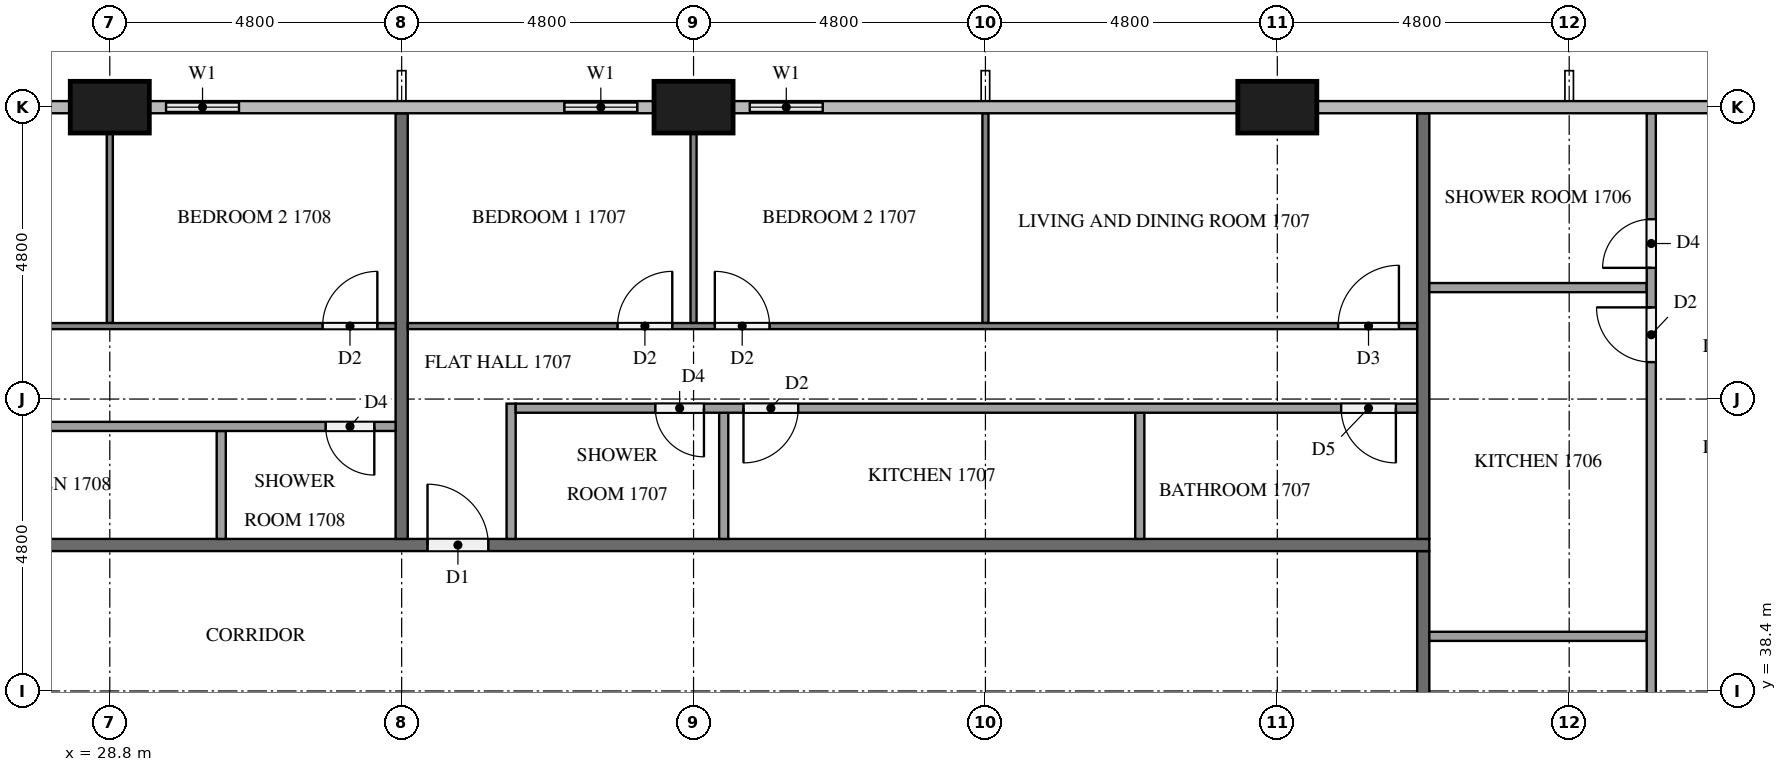
"""IFC4 building model, lengths in metres.
Left out: names, types, materials, properties, quantities, classifications, styles, units other than length and angle.
Written with IfcOpenShell. Run it as: python <this file> out.ifc"""

import sys

from ifc_helpers import new_model, si_unit, direction, frame, frame_2d, origin, origin_2d, place, context, subcontext, project, spatial, rectangle, extrude, element, fill, save


model = new_model("IFC4")
c1 = context("Model", 3, precision=1e-05, world=origin(), true_north=direction((0.0, 1.0)))
c2 = subcontext(c1, "Body", "Model", "MODEL_VIEW")
j1 = project(units=[si_unit("LENGTHUNIT", "METRE"), si_unit("PLANEANGLEUNIT", "RADIAN")], contexts=[c1])
p1 = place(None, origin())
s1 = spatial("IfcSite", under=j1, at=p1, CompositionType="ELEMENT")
p2 = place(p1, origin())
s2 = spatial("IfcBuilding", under=s1, at=p2, CompositionType="ELEMENT")
p3 = place(p2, frame((0.0, 0.0, 69.8)))
s3 = spatial("IfcBuildingStorey", under=s2, at=p3, CompositionType="ELEMENT", Elevation=69.8)
for number, where, z_axis, x_axis in (
    (1, (48.0, 48.0, 0.0), (0.0, 0.0, 1.0), (1.0, 0.0, 0.0)),
    (2, (38.4, 48.0, 0.0), (0.0, 0.0, 1.0), (1.0, 0.0, 0.0)),
    (3, (28.8, 48.0, 0.0), (0.0, 0.0, 1.0), (1.0, 0.0, 0.0)),
):
    element("IfcColumn", number, at=place(p3, frame(where, z_axis=z_axis, x_axis=x_axis)), inside=s3, PredefinedType="COLUMN", context=c2, shape_type="SweptSolid", body=[
        extrude(rectangle(XDim=1.3, YDim=0.85, at=origin_2d()), origin(), (0.0, 0.0, 1.0), 3.2),
    ])
p4 = place(p3, frame((40.8, 48.0, 0.0), z_axis=(0.0, 0.0, 1.0), x_axis=(-1.0, 0.0, 0.0)))
e4 = element("IfcWall", 4, at=p4, inside=s3, PredefinedType="SOLIDWALL", context=c2, shape_type="SweptSolid", body=[
    extrude(rectangle(XDim=1.75, YDim=0.15, at=frame_2d((0.875, 0.0))), origin(), (0.0, 0.0, 1.0), 3.2),
])
p5 = place(p4, frame((0.275, 0.0, 0.9)))
e5 = element("IfcOpeningElement", 5, at=p5, cuts=e4, PredefinedType="OPENING", context=c2, shape_type="SweptSolid", body=[
    extrude(rectangle(XDim=1.2, YDim=1.4, at=frame_2d((0.6, 0.7))), frame((0.0, 0.085, 0.0), z_axis=(0.0, -1.0, 0.0), x_axis=(1.0, 0.0, 0.0)), (0.0, 0.0, 1.0), 0.17),
])
p6 = place(p3, frame((37.75, 48.0, 0.0), z_axis=(0.0, 0.0, 1.0), x_axis=(-1.0, 0.0, 0.0)))
e6 = element("IfcWall", 6, at=p6, inside=s3, PredefinedType="SOLIDWALL", context=c2, shape_type="SweptSolid", body=[
    extrude(rectangle(XDim=1.75, YDim=0.15, at=frame_2d((0.875, 0.0))), origin(), (0.0, 0.0, 1.0), 3.2),
])
p7 = place(p6, frame((0.275, 0.0, 0.9)))
e7 = element("IfcOpeningElement", 7, at=p7, cuts=e6, PredefinedType="OPENING", context=c2, shape_type="SweptSolid", body=[
    extrude(rectangle(XDim=1.2, YDim=1.4, at=frame_2d((0.6, 0.7))), frame((0.0, 0.085, 0.0), z_axis=(0.0, -1.0, 0.0), x_axis=(1.0, 0.0, 0.0)), (0.0, 0.0, 1.0), 0.17),
])
p8 = place(p3, frame((31.2, 48.0, 0.0), z_axis=(0.0, 0.0, 1.0), x_axis=(-1.0, 0.0, 0.0)))
e8 = element("IfcWall", 8, at=p8, inside=s3, PredefinedType="SOLIDWALL", context=c2, shape_type="SweptSolid", body=[
    extrude(rectangle(XDim=1.75, YDim=0.15, at=frame_2d((0.875, 0.0))), origin(), (0.0, 0.0, 1.0), 3.2),
])
p9 = place(p8, frame((0.275, 0.0, 0.9)))
e9 = element("IfcOpeningElement", 9, at=p9, cuts=e8, PredefinedType="OPENING", context=c2, shape_type="SweptSolid", body=[
    extrude(rectangle(XDim=1.2, YDim=1.4, at=frame_2d((0.6, 0.7))), frame((0.0, 0.085, 0.0), z_axis=(0.0, -1.0, 0.0), x_axis=(1.0, 0.0, 0.0)), (0.0, 0.0, 1.0), 0.17),
])
p10 = place(p3, frame((50.4, 40.7, 0.0), z_axis=(0.0, 0.0, 1.0), x_axis=(0.0, -1.0, 0.0)))
e10 = element("IfcWall", 10, at=p10, inside=s3, PredefinedType="PARTITIONING", context=c2, shape_type="SweptSolid", body=[
    extrude(rectangle(XDim=28.6, YDim=0.2, at=frame_2d((14.3, 0.0))), origin(), (0.0, 0.0, 1.0), 3.2),
])
p11 = place(p10, frame((21.875, 0.0, 0.0)))
e11 = element("IfcOpeningElement", 11, at=p11, cuts=e10, PredefinedType="OPENING", context=c2, shape_type="SweptSolid", body=[
    extrude(rectangle(XDim=1.1, YDim=2.1, at=frame_2d((0.55, 1.05))), frame((0.0, 0.11, 0.0), z_axis=(0.0, -1.0, 0.0), x_axis=(1.0, 0.0, 0.0)), (0.0, 0.0, 1.0), 0.22),
])
p12 = place(p10, frame((20.075, 0.0, 0.0)))
e12 = element("IfcOpeningElement", 12, at=p12, cuts=e10, PredefinedType="OPENING", context=c2, shape_type="SweptSolid", body=[
    extrude(rectangle(XDim=1.0, YDim=2.1, at=frame_2d((0.5, 1.05))), frame((0.0, 0.11, 0.0), z_axis=(0.0, -1.0, 0.0), x_axis=(1.0, 0.0, 0.0)), (0.0, 0.0, 1.0), 0.22),
])
p13 = place(p10, frame((5.675, 0.0, 0.0)))
e13 = element("IfcOpeningElement", 13, at=p13, cuts=e10, PredefinedType="OPENING", context=c2, shape_type="SweptSolid", body=[
    extrude(rectangle(XDim=1.0, YDim=2.1, at=frame_2d((0.5, 1.05))), frame((0.0, 0.11, 0.0), z_axis=(0.0, -1.0, 0.0), x_axis=(1.0, 0.0, 0.0)), (0.0, 0.0, 1.0), 0.22),
])
p14 = place(p3, frame((11.9, 40.8, 0.0), z_axis=(0.0, 0.0, 1.0), x_axis=(1.0, 0.0, 0.0)))
e14 = element("IfcWall", 14, at=p14, inside=s3, PredefinedType="PARTITIONING", context=c2, shape_type="SweptSolid", body=[
    extrude(rectangle(XDim=38.6, YDim=0.2, at=frame_2d((19.3, 0.0))), origin(), (0.0, 0.0, 1.0), 3.2),
])
p15 = place(p14, frame((22.125, 0.0, 0.0)))
e15 = element("IfcOpeningElement", 15, at=p15, cuts=e14, PredefinedType="OPENING", context=c2, shape_type="SweptSolid", body=[
    extrude(rectangle(XDim=1.0, YDim=2.1, at=frame_2d((0.5, 1.05))), frame((0.0, 0.11, 0.0), z_axis=(0.0, -1.0, 0.0), x_axis=(1.0, 0.0, 0.0)), (0.0, 0.0, 1.0), 0.22),
])
p16 = place(p14, frame((7.725, 0.0, 0.0)))
e16 = element("IfcOpeningElement", 16, at=p16, cuts=e14, PredefinedType="OPENING", context=c2, shape_type="SweptSolid", body=[
    extrude(rectangle(XDim=1.0, YDim=2.1, at=frame_2d((0.5, 1.05))), frame((0.0, 0.11, 0.0), z_axis=(0.0, -1.0, 0.0), x_axis=(1.0, 0.0, 0.0)), (0.0, 0.0, 1.0), 0.22),
])
p17 = place(p14, frame((5.875, 0.0, 0.0)))
e17 = element("IfcOpeningElement", 17, at=p17, cuts=e14, PredefinedType="OPENING", context=c2, shape_type="SweptSolid", body=[
    extrude(rectangle(XDim=1.0, YDim=2.1, at=frame_2d((0.5, 1.05))), frame((0.0, 0.11, 0.0), z_axis=(0.0, -1.0, 0.0), x_axis=(1.0, 0.0, 0.0)), (0.0, 0.0, 1.0), 0.22),
])
for number, where, z_axis, x_axis in (
    (18, (50.4, 40.9, 0.0), (0.0, 0.0, 1.0), (0.0, 1.0, 0.0)),
    (19, (33.6, 47.9, 0.0), (0.0, 0.0, 1.0), (0.0, -1.0, 0.0)),
):
    element("IfcWall", number, at=place(p3, frame(where, z_axis=z_axis, x_axis=x_axis)), inside=s3, PredefinedType="PARTITIONING", context=c2, shape_type="SweptSolid", body=[
        extrude(rectangle(XDim=7.0, YDim=0.2, at=frame_2d((3.5, 0.0))), origin(), (0.0, 0.0, 1.0), 3.2),
    ])
for number, where, z_axis, x_axis in (
    (20, (50.5, 39.298, 0.0), (0.0, 0.0, 1.0), (1.0, 0.0, 0.0)),
    (21, (50.5, 45.033, 0.0), (0.0, 0.0, 1.0), (1.0, 0.0, 0.0)),
):
    element("IfcWall", number, at=place(p3, frame(where, z_axis=z_axis, x_axis=x_axis)), inside=s3, PredefinedType="PARTITIONING", context=c2, shape_type="SweptSolid", body=[
        extrude(rectangle(XDim=3.575, YDim=0.15, at=frame_2d((1.788, 0.0))), origin(), (0.0, 0.0, 1.0), 3.2),
    ])
p18 = place(p3, frame((54.15, 35.475, 0.0), z_axis=(0.0, 0.0, 1.0), x_axis=(0.0, 1.0, 0.0)))
e22 = element("IfcWall", 22, at=p18, inside=s3, PredefinedType="PARTITIONING", context=c2, shape_type="SweptSolid", body=[
    extrude(rectangle(XDim=12.425, YDim=0.15, at=frame_2d((6.212, 0.0))), origin(), (0.0, 0.0, 1.0), 3.2),
])
p19 = place(p18, frame((0.3, 0.0, 0.0)))
e23 = element("IfcOpeningElement", 23, at=p19, cuts=e22, PredefinedType="OPENING", context=c2, shape_type="SweptSolid", body=[
    extrude(rectangle(XDim=0.9, YDim=2.1, at=frame_2d((0.45, 1.05))), frame((0.0, 0.085, 0.0), z_axis=(0.0, -1.0, 0.0), x_axis=(1.0, 0.0, 0.0)), (0.0, 0.0, 1.0), 0.17),
])
p20 = place(p18, frame((8.333, 0.0, 0.0)))
e24 = element("IfcOpeningElement", 24, at=p20, cuts=e22, PredefinedType="OPENING", context=c2, shape_type="SweptSolid", body=[
    extrude(rectangle(XDim=0.9, YDim=2.1, at=frame_2d((0.45, 1.05))), frame((0.0, 0.085, 0.0), z_axis=(0.0, -1.0, 0.0), x_axis=(1.0, 0.0, 0.0)), (0.0, 0.0, 1.0), 0.17),
])
p21 = place(p18, frame((9.883, 0.0, 0.0)))
e25 = element("IfcOpeningElement", 25, at=p21, cuts=e22, PredefinedType="OPENING", context=c2, shape_type="SweptSolid", body=[
    extrude(rectangle(XDim=0.8, YDim=2.1, at=frame_2d((0.4, 1.05))), frame((0.0, 0.085, 0.0), z_axis=(0.0, -1.0, 0.0), x_axis=(1.0, 0.0, 0.0)), (0.0, 0.0, 1.0), 0.17),
])
p22 = place(p3, frame((38.4, 44.45, 0.0), z_axis=(0.0, 0.0, 1.0), x_axis=(0.0, 1.0, 0.0)))
e26 = element("IfcWall", 26, at=p22, inside=s3, PredefinedType="PARTITIONING", context=c2, shape_type="SweptSolid", body=[
    extrude(rectangle(XDim=3.125, YDim=0.1, at=frame_2d((1.562, 0.0))), origin(), (0.0, 0.0, 1.0), 3.2),
])
p23 = place(p3, frame((43.2, 44.45, 0.0), z_axis=(0.0, 0.0, 1.0), x_axis=(0.0, 1.0, 0.0)))
e27 = element("IfcWall", 27, at=p23, inside=s3, PredefinedType="PARTITIONING", context=c2, shape_type="SweptSolid", body=[
    extrude(rectangle(XDim=3.45, YDim=0.1, at=frame_2d((1.725, 0.0))), origin(), (0.0, 0.0, 1.0), 3.2),
])
p24 = place(p3, frame((33.7, 44.4, 0.0), z_axis=(0.0, 0.0, 1.0), x_axis=(1.0, 0.0, 0.0)))
e28 = element("IfcWall", 28, at=p24, inside=s3, PredefinedType="PARTITIONING", context=c2, shape_type="SweptSolid", body=[
    extrude(rectangle(XDim=16.6, YDim=0.1, at=frame_2d((8.3, 0.0))), origin(), (0.0, 0.0, 1.0), 3.2),
])
p25 = place(p24, frame((3.45, 0.0, 0.0)))
e29 = element("IfcOpeningElement", 29, at=p25, cuts=e28, PredefinedType="OPENING", context=c2, shape_type="SweptSolid", body=[
    extrude(rectangle(XDim=0.9, YDim=2.1, at=frame_2d((0.45, 1.05))), frame((0.0, 0.06, 0.0), z_axis=(0.0, -1.0, 0.0), x_axis=(1.0, 0.0, 0.0)), (0.0, 0.0, 1.0), 0.12),
])
p26 = place(p24, frame((5.05, 0.0, 0.0)))
e30 = element("IfcOpeningElement", 30, at=p26, cuts=e28, PredefinedType="OPENING", context=c2, shape_type="SweptSolid", body=[
    extrude(rectangle(XDim=0.9, YDim=2.1, at=frame_2d((0.45, 1.05))), frame((0.0, 0.06, 0.0), z_axis=(0.0, -1.0, 0.0), x_axis=(1.0, 0.0, 0.0)), (0.0, 0.0, 1.0), 0.12),
])
p27 = place(p24, frame((15.3, 0.0, 0.0)))
e31 = element("IfcOpeningElement", 31, at=p27, cuts=e28, PredefinedType="OPENING", context=c2, shape_type="SweptSolid", body=[
    extrude(rectangle(XDim=1.0, YDim=2.1, at=frame_2d((0.5, 1.05))), frame((0.0, 0.06, 0.0), z_axis=(0.0, -1.0, 0.0), x_axis=(1.0, 0.0, 0.0)), (0.0, 0.0, 1.0), 0.12),
])
for number, where, z_axis, x_axis in (
    (32, (38.896, 40.9, 0.0), (0.0, 0.0, 1.0), (0.0, 1.0, 0.0)),
    (33, (45.739, 40.9, 0.0), (0.0, 0.0, 1.0), (0.0, 1.0, 0.0)),
):
    element("IfcWall", number, at=place(p3, frame(where, z_axis=z_axis, x_axis=x_axis)), inside=s3, PredefinedType="PARTITIONING", context=c2, shape_type="SweptSolid", body=[
        extrude(rectangle(XDim=2.075, YDim=0.15, at=frame_2d((1.038, 0.0))), origin(), (0.0, 0.0, 1.0), 3.2),
    ])
p28 = place(p3, frame((35.4, 40.9, 0.0), z_axis=(0.0, 0.0, 1.0), x_axis=(0.0, 1.0, 0.0)))
e34 = element("IfcWall", 34, at=p28, inside=s3, PredefinedType="PARTITIONING", context=c2, shape_type="SweptSolid", body=[
    extrude(rectangle(XDim=2.225, YDim=0.15, at=frame_2d((1.113, 0.0))), origin(), (0.0, 0.0, 1.0), 3.2),
])
p29 = place(p3, frame((50.3, 43.05, 0.0), z_axis=(0.0, 0.0, 1.0), x_axis=(-1.0, 0.0, 0.0)))
e35 = element("IfcWall", 35, at=p29, inside=s3, PredefinedType="PARTITIONING", context=c2, shape_type="SweptSolid", body=[
    extrude(rectangle(XDim=14.825, YDim=0.15, at=frame_2d((7.413, 0.0))), origin(), (0.0, 0.0, 1.0), 3.2),
])
p30 = place(p29, frame((11.729, 0.0, 0.0)))
e36 = element("IfcOpeningElement", 36, at=p30, cuts=e35, PredefinedType="OPENING", context=c2, shape_type="SweptSolid", body=[
    extrude(rectangle(XDim=0.8, YDim=2.1, at=frame_2d((0.4, 1.05))), frame((0.0, 0.085, 0.0), z_axis=(0.0, -1.0, 0.0), x_axis=(1.0, 0.0, 0.0)), (0.0, 0.0, 1.0), 0.17),
])
p31 = place(p29, frame((10.179, 0.0, 0.0)))
e37 = element("IfcOpeningElement", 37, at=p31, cuts=e35, PredefinedType="OPENING", context=c2, shape_type="SweptSolid", body=[
    extrude(rectangle(XDim=0.9, YDim=2.1, at=frame_2d((0.45, 1.05))), frame((0.0, 0.085, 0.0), z_axis=(0.0, -1.0, 0.0), x_axis=(1.0, 0.0, 0.0)), (0.0, 0.0, 1.0), 0.17),
])
p32 = place(p29, frame((0.35, 0.0, 0.0)))
e38 = element("IfcOpeningElement", 38, at=p32, cuts=e35, PredefinedType="OPENING", context=c2, shape_type="SweptSolid", body=[
    extrude(rectangle(XDim=0.9, YDim=2.1, at=frame_2d((0.45, 1.05))), frame((0.0, 0.085, 0.0), z_axis=(0.0, -1.0, 0.0), x_axis=(1.0, 0.0, 0.0)), (0.0, 0.0, 1.0), 0.17),
])
p33 = place(p3, frame((28.8, 44.45, 0.0), z_axis=(0.0, 0.0, 1.0), x_axis=(0.0, 1.0, 0.0)))
e39 = element("IfcWall", 39, at=p33, inside=s3, PredefinedType="PARTITIONING", context=c2, shape_type="SweptSolid", body=[
    extrude(rectangle(XDim=3.125, YDim=0.1, at=frame_2d((1.562, 0.0))), origin(), (0.0, 0.0, 1.0), 3.2),
])
p34 = place(p3, frame((19.3, 44.4, 0.0), z_axis=(0.0, 0.0, 1.0), x_axis=(1.0, 0.0, 0.0)))
e40 = element("IfcWall", 40, at=p34, inside=s3, PredefinedType="PARTITIONING", context=c2, shape_type="SweptSolid", body=[
    extrude(rectangle(XDim=14.2, YDim=0.1, at=frame_2d((7.1, 0.0))), origin(), (0.0, 0.0, 1.0), 3.2),
])
p35 = place(p34, frame((3.45, 0.0, 0.0)))
e41 = element("IfcOpeningElement", 41, at=p35, cuts=e40, PredefinedType="OPENING", context=c2, shape_type="SweptSolid", body=[
    extrude(rectangle(XDim=0.9, YDim=2.1, at=frame_2d((0.45, 1.05))), frame((0.0, 0.06, 0.0), z_axis=(0.0, -1.0, 0.0), x_axis=(1.0, 0.0, 0.0)), (0.0, 0.0, 1.0), 0.12),
])
p36 = place(p34, frame((5.05, 0.0, 0.0)))
e42 = element("IfcOpeningElement", 42, at=p36, cuts=e40, PredefinedType="OPENING", context=c2, shape_type="SweptSolid", body=[
    extrude(rectangle(XDim=1.0, YDim=2.1, at=frame_2d((0.5, 1.05))), frame((0.0, 0.06, 0.0), z_axis=(0.0, -1.0, 0.0), x_axis=(1.0, 0.0, 0.0)), (0.0, 0.0, 1.0), 0.12),
])
p37 = place(p34, frame((13.0, 0.0, 0.0)))
e43 = element("IfcOpeningElement", 43, at=p37, cuts=e40, PredefinedType="OPENING", context=c2, shape_type="SweptSolid", body=[
    extrude(rectangle(XDim=0.9, YDim=2.1, at=frame_2d((0.45, 1.05))), frame((0.0, 0.06, 0.0), z_axis=(0.0, -1.0, 0.0), x_axis=(1.0, 0.0, 0.0)), (0.0, 0.0, 1.0), 0.12),
])
p38 = place(p3, frame((30.633, 40.9, 0.0), z_axis=(0.0, 0.0, 1.0), x_axis=(0.0, 1.0, 0.0)))
e44 = element("IfcWall", 44, at=p38, inside=s3, PredefinedType="PARTITIONING", context=c2, shape_type="SweptSolid", body=[
    extrude(rectangle(XDim=1.775, YDim=0.15, at=frame_2d((0.888, 0.0))), origin(), (0.0, 0.0, 1.0), 3.2),
])
p39 = place(p3, frame((33.5, 42.75, 0.0), z_axis=(0.0, 0.0, 1.0), x_axis=(-1.0, 0.0, 0.0)))
e45 = element("IfcWall", 45, at=p39, inside=s3, PredefinedType="PARTITIONING", context=c2, shape_type="SweptSolid", body=[
    extrude(rectangle(XDim=12.425, YDim=0.15, at=frame_2d((6.212, 0.0))), origin(), (0.0, 0.0, 1.0), 3.2),
])
p40 = place(p39, frame((8.927, 0.0, 0.0)))
e46 = element("IfcOpeningElement", 46, at=p40, cuts=e45, PredefinedType="OPENING", context=c2, shape_type="SweptSolid", body=[
    extrude(rectangle(XDim=0.9, YDim=2.1, at=frame_2d((0.45, 1.05))), frame((0.0, 0.085, 0.0), z_axis=(0.0, -1.0, 0.0), x_axis=(1.0, 0.0, 0.0)), (0.0, 0.0, 1.0), 0.17),
])
p41 = place(p39, frame((7.377, 0.0, 0.0)))
e47 = element("IfcOpeningElement", 47, at=p41, cuts=e45, PredefinedType="OPENING", context=c2, shape_type="SweptSolid", body=[
    extrude(rectangle(XDim=0.9, YDim=2.1, at=frame_2d((0.45, 1.05))), frame((0.0, 0.085, 0.0), z_axis=(0.0, -1.0, 0.0), x_axis=(1.0, 0.0, 0.0)), (0.0, 0.0, 1.0), 0.17),
])
p42 = place(p39, frame((0.35, 0.0, 0.0)))
e48 = element("IfcOpeningElement", 48, at=p42, cuts=e45, PredefinedType="OPENING", context=c2, shape_type="SweptSolid", body=[
    extrude(rectangle(XDim=0.8, YDim=2.1, at=frame_2d((0.4, 1.05))), frame((0.0, 0.085, 0.0), z_axis=(0.0, -1.0, 0.0), x_axis=(1.0, 0.0, 0.0)), (0.0, 0.0, 1.0), 0.17),
])
p43 = place(p5, origin())
e49 = element("IfcWindow", 49, at=p43, inside=s3, PartitioningType="SINGLE_PANEL", PredefinedType="WINDOW", context=c2, shape_type="SweptSolid", body=[
    extrude(rectangle(XDim=1.2, YDim=1.4, at=frame_2d((0.6, 0.7))), frame((0.0, 0.03, 0.0), z_axis=(0.0, -1.0, 0.0), x_axis=(1.0, 0.0, 0.0)), (0.0, 0.0, 1.0), 0.06),
])
fill(e5, e49)
p44 = place(p7, origin())
e50 = element("IfcWindow", 50, at=p44, inside=s3, PartitioningType="SINGLE_PANEL", PredefinedType="WINDOW", context=c2, shape_type="SweptSolid", body=[
    extrude(rectangle(XDim=1.2, YDim=1.4, at=frame_2d((0.6, 0.7))), frame((0.0, 0.03, 0.0), z_axis=(0.0, -1.0, 0.0), x_axis=(1.0, 0.0, 0.0)), (0.0, 0.0, 1.0), 0.06),
])
fill(e7, e50)
p45 = place(p9, origin())
e51 = element("IfcWindow", 51, at=p45, inside=s3, PartitioningType="SINGLE_PANEL", PredefinedType="WINDOW", context=c2, shape_type="SweptSolid", body=[
    extrude(rectangle(XDim=1.2, YDim=1.4, at=frame_2d((0.6, 0.7))), frame((0.0, 0.03, 0.0), z_axis=(0.0, -1.0, 0.0), x_axis=(1.0, 0.0, 0.0)), (0.0, 0.0, 1.0), 0.06),
])
fill(e9, e51)
p46 = place(p15, origin())
e52 = element("IfcDoor", 52, at=p46, inside=s3, OperationType="SINGLE_SWING_LEFT", PredefinedType="DOOR", context=c2, shape_type="SweptSolid", body=[
    extrude(rectangle(XDim=1.0, YDim=2.1, at=frame_2d((0.5, 1.05))), frame((0.0, 0.025, 0.0), z_axis=(0.0, -1.0, 0.0), x_axis=(1.0, 0.0, 0.0)), (0.0, 0.0, 1.0), 0.05),
])
fill(e15, e52)
p47 = place(p20, origin())
e53 = element("IfcDoor", 53, at=p47, inside=s3, OperationType="SINGLE_SWING_RIGHT", PredefinedType="DOOR", context=c2, shape_type="SweptSolid", body=[
    extrude(rectangle(XDim=0.9, YDim=2.1, at=frame_2d((0.45, 1.05))), frame((0.0, 0.025, 0.0), z_axis=(0.0, -1.0, 0.0), x_axis=(1.0, 0.0, 0.0)), (0.0, 0.0, 1.0), 0.05),
])
fill(e24, e53)
p48 = place(p21, origin())
e54 = element("IfcDoor", 54, at=p48, inside=s3, OperationType="SINGLE_SWING_LEFT", PredefinedType="DOOR", context=c2, shape_type="SweptSolid", body=[
    extrude(rectangle(XDim=0.8, YDim=2.1, at=frame_2d((0.4, 1.05))), frame((0.0, 0.025, 0.0), z_axis=(0.0, -1.0, 0.0), x_axis=(1.0, 0.0, 0.0)), (0.0, 0.0, 1.0), 0.05),
])
fill(e25, e54)
p49 = place(p25, origin())
e55 = element("IfcDoor", 55, at=p49, inside=s3, OperationType="SINGLE_SWING_RIGHT", PredefinedType="DOOR", context=c2, shape_type="SweptSolid", body=[
    extrude(rectangle(XDim=0.9, YDim=2.1, at=frame_2d((0.45, 1.05))), frame((0.0, 0.025, 0.0), z_axis=(0.0, -1.0, 0.0), x_axis=(1.0, 0.0, 0.0)), (0.0, 0.0, 1.0), 0.05),
])
fill(e29, e55)
p50 = place(p26, origin())
e56 = element("IfcDoor", 56, at=p50, inside=s3, OperationType="SINGLE_SWING_LEFT", PredefinedType="DOOR", context=c2, shape_type="SweptSolid", body=[
    extrude(rectangle(XDim=0.9, YDim=2.1, at=frame_2d((0.45, 1.05))), frame((0.0, 0.025, 0.0), z_axis=(0.0, -1.0, 0.0), x_axis=(1.0, 0.0, 0.0)), (0.0, 0.0, 1.0), 0.05),
])
fill(e30, e56)
p51 = place(p27, origin())
e57 = element("IfcDoor", 57, at=p51, inside=s3, OperationType="SINGLE_SWING_RIGHT", PredefinedType="DOOR", context=c2, shape_type="SweptSolid", body=[
    extrude(rectangle(XDim=1.0, YDim=2.1, at=frame_2d((0.5, 1.05))), frame((0.0, 0.025, 0.0), z_axis=(0.0, -1.0, 0.0), x_axis=(1.0, 0.0, 0.0)), (0.0, 0.0, 1.0), 0.05),
])
fill(e31, e57)
p52 = place(p30, origin())
e58 = element("IfcDoor", 58, at=p52, inside=s3, OperationType="SINGLE_SWING_LEFT", PredefinedType="DOOR", context=c2, shape_type="SweptSolid", body=[
    extrude(rectangle(XDim=0.8, YDim=2.1, at=frame_2d((0.4, 1.05))), frame((0.0, 0.025, 0.0), z_axis=(0.0, -1.0, 0.0), x_axis=(1.0, 0.0, 0.0)), (0.0, 0.0, 1.0), 0.05),
])
fill(e36, e58)
p53 = place(p31, origin())
e59 = element("IfcDoor", 59, at=p53, inside=s3, OperationType="SINGLE_SWING_RIGHT", PredefinedType="DOOR", context=c2, shape_type="SweptSolid", body=[
    extrude(rectangle(XDim=0.9, YDim=2.1, at=frame_2d((0.45, 1.05))), frame((0.0, 0.025, 0.0), z_axis=(0.0, -1.0, 0.0), x_axis=(1.0, 0.0, 0.0)), (0.0, 0.0, 1.0), 0.05),
])
fill(e37, e59)
p54 = place(p32, origin())
e60 = element("IfcDoor", 60, at=p54, inside=s3, OperationType="SINGLE_SWING_LEFT", PredefinedType="DOOR", context=c2, shape_type="SweptSolid", body=[
    extrude(rectangle(XDim=0.9, YDim=2.1, at=frame_2d((0.45, 1.05))), frame((0.0, 0.025, 0.0), z_axis=(0.0, -1.0, 0.0), x_axis=(1.0, 0.0, 0.0)), (0.0, 0.0, 1.0), 0.05),
])
fill(e38, e60)
p55 = place(p37, origin())
e61 = element("IfcDoor", 61, at=p55, inside=s3, OperationType="SINGLE_SWING_RIGHT", PredefinedType="DOOR", context=c2, shape_type="SweptSolid", body=[
    extrude(rectangle(XDim=0.9, YDim=2.1, at=frame_2d((0.45, 1.05))), frame((0.0, 0.025, 0.0), z_axis=(0.0, -1.0, 0.0), x_axis=(1.0, 0.0, 0.0)), (0.0, 0.0, 1.0), 0.05),
])
fill(e43, e61)
p56 = place(p42, origin())
e62 = element("IfcDoor", 62, at=p56, inside=s3, OperationType="SINGLE_SWING_LEFT", PredefinedType="DOOR", context=c2, shape_type="SweptSolid", body=[
    extrude(rectangle(XDim=0.8, YDim=2.1, at=frame_2d((0.4, 1.05))), frame((0.0, 0.025, 0.0), z_axis=(0.0, -1.0, 0.0), x_axis=(1.0, 0.0, 0.0)), (0.0, 0.0, 1.0), 0.05),
])
fill(e48, e62)
save(model, sys.argv[1])
